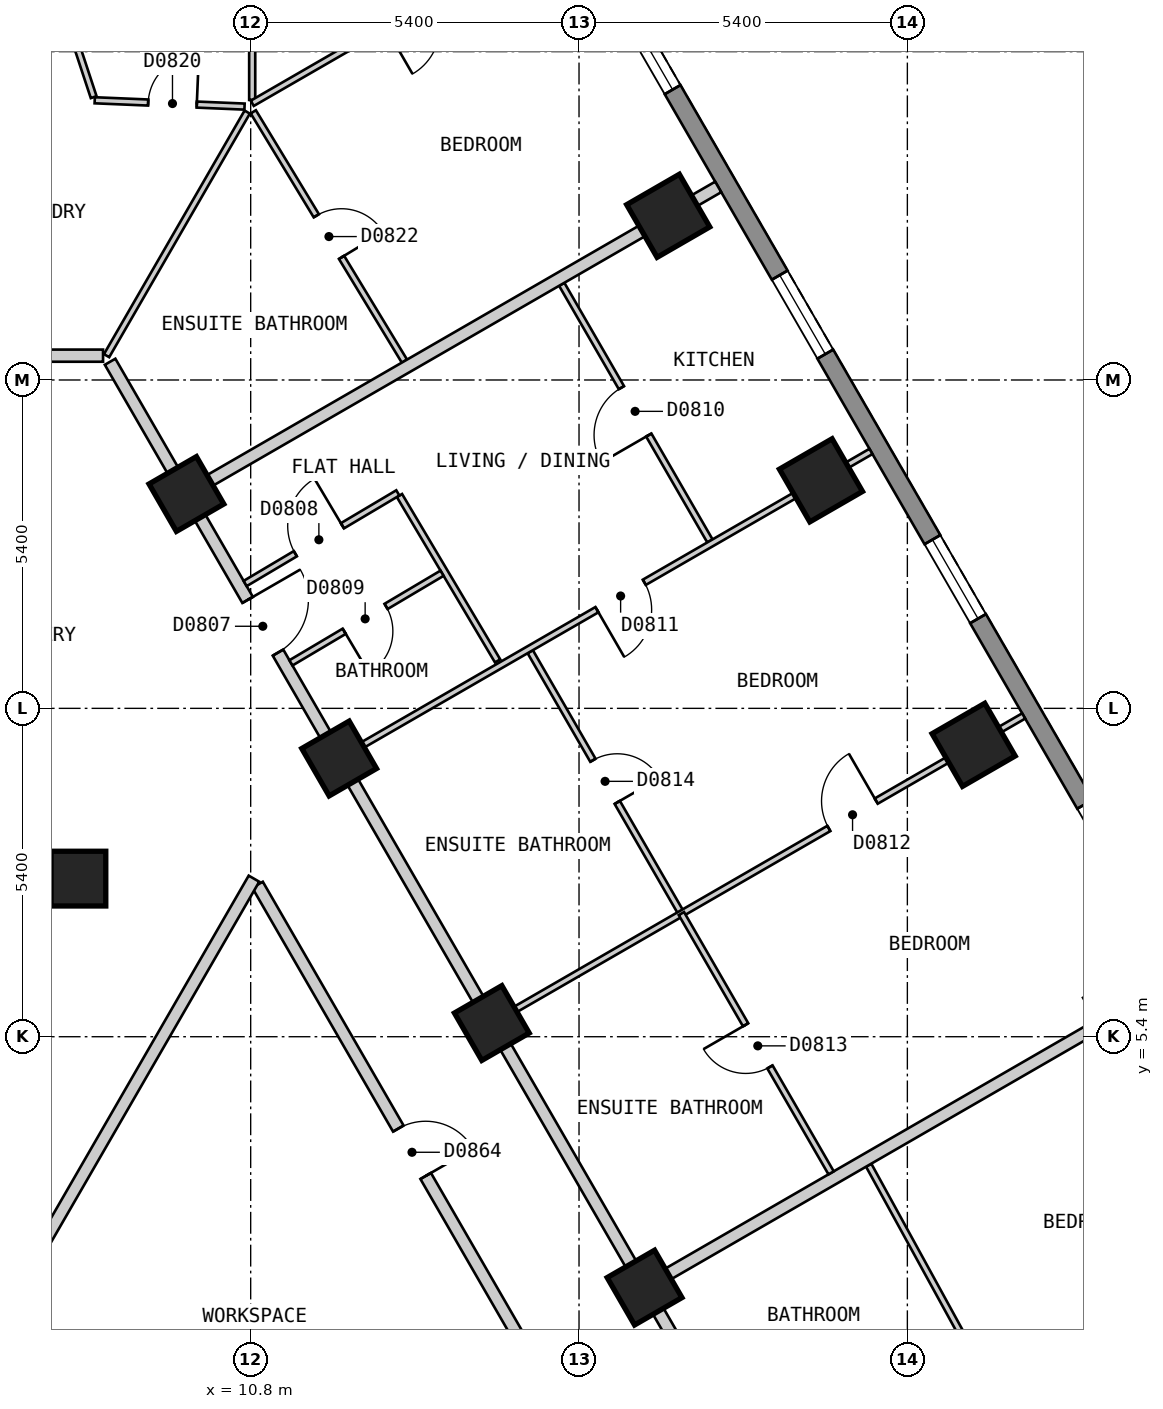
"""IFC4 building model, lengths in metres.
Left out: names, types, materials, properties, quantities, classifications, styles, units other than length and angle.
Written with IfcOpenShell. Run it as: python <this file> out.ifc"""

import sys

from ifc_helpers import new_model, si_unit, direction, frame, frame_2d, origin, origin_2d, place, context, subcontext, project, spatial, polyline, rectangle, outline, extrude, element, fill, save


model = new_model("IFC4")
c1 = context("Model", 3, precision=1e-05, world=origin(), true_north=direction((0.0, 1.0)))
c2 = subcontext(c1, "Body", "Model", "MODEL_VIEW")
j1 = project(units=[si_unit("LENGTHUNIT", "METRE"), si_unit("PLANEANGLEUNIT", "RADIAN")], contexts=[c1])
p1 = place(None, origin())
s1 = spatial("IfcSite", under=j1, at=p1, CompositionType="ELEMENT")
p2 = place(p1, origin())
s2 = spatial("IfcBuilding", under=s1, at=p2, CompositionType="ELEMENT")
p3 = place(p2, frame((0.0, 0.0, 84.0)))
s3 = spatial("IfcBuildingStorey", under=s2, at=p3, CompositionType="ELEMENT", Elevation=84.0)
for number, where, z_axis, x_axis in (
    (1, (22.69, 10.2, 0.0), (0.0, 0.0, 1.0), (-0.5, 0.866, 0.0)),
    (2, (20.179, 14.55, 0.0), (0.0, 0.0, 1.0), (-0.5, 0.866, 0.0)),
    (3, (17.667, 18.9, 0.0), (0.0, 0.0, 1.0), (-0.5, 0.866, 0.0)),
):
    element("IfcColumn", number, at=place(p3, frame(where, z_axis=z_axis, x_axis=x_axis)), inside=s3, PredefinedType="COLUMN", context=c2, shape_type="SweptSolid", body=[
        extrude(rectangle(XDim=1.0, YDim=1.0, at=origin_2d()), origin(), (0.0, 0.0, 1.0), 3.0),
    ])
for number, where, z_axis, x_axis in (
    (4, (17.278, 1.274, 0.0), (0.0, 0.0, 1.0), (-0.5, 0.866, 0.0)),
    (5, (14.766, 5.625, 0.0), (0.0, 0.0, 1.0), (-0.5, 0.866, 0.0)),
    (6, (12.255, 9.975, 0.0), (0.0, 0.0, 1.0), (-0.5, 0.866, 0.0)),
    (7, (7.967, 8.0, 0.0), (0.0, 0.0, 1.0), (1.0, 0.0, 0.0)),
    (8, (9.743, 14.325, 0.0), (0.0, 0.0, 1.0), (-0.5, 0.866, 0.0)),
):
    element("IfcColumn", number, at=place(p3, frame(where, z_axis=z_axis, x_axis=x_axis)), inside=s3, PredefinedType="COLUMN", context=c2, shape_type="SweptSolid", body=[
        extrude(rectangle(XDim=0.9, YDim=0.9, at=origin_2d()), origin(), (0.0, 0.0, 1.0), 3.0),
    ])
p4 = place(p3, frame((29.027, 1.425, 0.0), z_axis=(0.0, 0.0, 1.0), x_axis=(-0.500027479704, 0.866009537788, 0.0)))
e9 = element("IfcWall", 9, at=p4, inside=s3, PredefinedType="SOLIDWALL", context=c2, shape_type="SweptSolid", body=[
    extrude(outline(polyline([(0.0, -0.15), (26.559, -0.15), (26.478, 0.15), (0.08, 0.15), (0.0, -0.15)])), origin(), (0.0, 0.0, 1.0), 2.7),
])
p5 = place(p4, frame((2.483, 0.0, 0.15)))
e10 = element("IfcOpeningElement", 10, at=p5, cuts=e9, PredefinedType="OPENING", context=c2, shape_type="SweptSolid", body=[
    extrude(rectangle(XDim=1.5, YDim=2.1, at=frame_2d((0.75, 1.05))), frame((0.0, 0.16, 0.0), z_axis=(0.0, -1.0, 0.0), x_axis=(1.0, 0.0, 0.0)), (0.0, 0.0, 1.0), 0.32),
])
p6 = place(p4, frame((7.506, 0.0, 0.15)))
e11 = element("IfcOpeningElement", 11, at=p6, cuts=e9, PredefinedType="OPENING", context=c2, shape_type="SweptSolid", body=[
    extrude(rectangle(XDim=1.5, YDim=2.1, at=frame_2d((0.75, 1.05))), frame((0.0, 0.16, 0.0), z_axis=(0.0, -1.0, 0.0), x_axis=(1.0, 0.0, 0.0)), (0.0, 0.0, 1.0), 0.32),
])
p7 = place(p4, frame((12.529, 0.0, 0.15)))
e12 = element("IfcOpeningElement", 12, at=p7, cuts=e9, PredefinedType="OPENING", context=c2, shape_type="SweptSolid", body=[
    extrude(rectangle(XDim=1.5, YDim=2.1, at=frame_2d((0.75, 1.05))), frame((0.0, 0.16, 0.0), z_axis=(0.0, -1.0, 0.0), x_axis=(1.0, 0.0, 0.0)), (0.0, 0.0, 1.0), 0.32),
])
p8 = place(p4, frame((17.552, 0.0, 0.15)))
e13 = element("IfcOpeningElement", 13, at=p8, cuts=e9, PredefinedType="OPENING", context=c2, shape_type="SweptSolid", body=[
    extrude(rectangle(XDim=1.5, YDim=2.1, at=frame_2d((0.75, 1.05))), frame((0.0, 0.16, 0.0), z_axis=(0.0, -1.0, 0.0), x_axis=(1.0, 0.0, 0.0)), (0.0, 0.0, 1.0), 0.32),
])
p9 = place(p4, frame((22.575, 0.0, 0.15)))
e14 = element("IfcOpeningElement", 14, at=p9, cuts=e9, PredefinedType="OPENING", context=c2, shape_type="SweptSolid", body=[
    extrude(rectangle(XDim=1.5, YDim=2.1, at=frame_2d((0.75, 1.05))), frame((0.0, 0.16, 0.0), z_axis=(0.0, -1.0, 0.0), x_axis=(1.0, 0.0, 0.0)), (0.0, 0.0, 1.0), 0.32),
])
p10 = place(p3, frame((10.913, 7.899, 0.0), z_axis=(0.0, 0.0, 1.0), x_axis=(0.500028940566, -0.866008694296, 0.0)))
e15 = element("IfcWall", 15, at=p10, inside=s3, PredefinedType="PARTITIONING", context=c2, shape_type="SweptSolid", body=[
    extrude(rectangle(XDim=10.159, YDim=0.2, at=frame_2d((5.08, 0.0))), origin(), (0.0, 0.0, 1.0), 2.7),
])
p11 = place(p10, frame((4.63, 0.0, 0.0)))
e16 = element("IfcOpeningElement", 16, at=p11, cuts=e15, PredefinedType="OPENING", context=c2, shape_type="SweptSolid", body=[
    extrude(rectangle(XDim=0.9, YDim=2.1, at=frame_2d((0.45, 1.05))), frame((0.0, 0.11, 0.0), z_axis=(0.0, -1.0, 0.0), x_axis=(1.0, 0.0, 0.0)), (0.0, 0.0, 1.0), 0.22),
])
p12 = place(p3, frame((8.488, 16.5, 0.0), z_axis=(0.0, 0.0, 1.0), x_axis=(0.499986836607, -0.86603300354, 0.0)))
e17 = element("IfcWall", 17, at=p12, inside=s3, PredefinedType="PARTITIONING", context=c2, shape_type="SweptSolid", body=[
    extrude(rectangle(XDim=20.09, YDim=0.2, at=frame_2d((10.045, 0.0))), origin(), (0.0, 0.0, 1.0), 2.7),
])
p13 = place(p12, frame((4.523, 0.0, 0.0)))
e18 = element("IfcOpeningElement", 18, at=p13, cuts=e17, PredefinedType="OPENING", context=c2, shape_type="SweptSolid", body=[
    extrude(rectangle(XDim=1.0, YDim=2.1, at=frame_2d((0.5, 1.05))), frame((0.0, 0.11, 0.0), z_axis=(0.0, -1.0, 0.0), x_axis=(1.0, 0.0, 0.0)), (0.0, 0.0, 1.0), 0.22),
])
p14 = place(p3, frame((5.889, 16.6, 0.0), z_axis=(0.0, 0.0, 1.0), x_axis=(1.0, 0.0, 0.0)))
e19 = element("IfcWall", 19, at=p14, inside=s3, PredefinedType="PARTITIONING", context=c2, shape_type="SweptSolid", body=[
    extrude(rectangle(XDim=2.483, YDim=0.2, at=frame_2d((1.242, 0.0))), origin(), (0.0, 0.0, 1.0), 2.7),
])
p15 = place(p3, frame((6.928, 1.2, 0.0), z_axis=(0.0, 0.0, 1.0), x_axis=(0.500055327065, 0.865993458332, 0.0)))
e20 = element("IfcWall", 20, at=p15, inside=s3, PredefinedType="PARTITIONING", context=c2, shape_type="SweptSolid", body=[
    extrude(rectangle(XDim=7.851, YDim=0.2, at=frame_2d((3.926, 0.0))), origin(), (0.0, 0.0, 1.0), 2.7),
])
p16 = place(p3, frame((7.769, 22.212, 0.0), z_axis=(0.0, 0.0, 1.0), x_axis=(0.313312924695, -0.949649941409, 0.0)))
e21 = element("IfcWall", 21, at=p16, inside=s3, PredefinedType="PARTITIONING", context=c2, shape_type="SweptSolid", body=[
    extrude(rectangle(XDim=1.433, YDim=0.1, at=frame_2d((0.717, 0.0))), origin(), (0.0, 0.0, 1.0), 2.7),
])
p17 = place(p3, frame((10.843, 20.61, 0.0), z_axis=(0.0, 0.0, 1.0), x_axis=(0.518481125811, -0.855089072657, 0.0)))
e22 = element("IfcWall", 22, at=p17, inside=s3, PredefinedType="PARTITIONING", context=c2, shape_type="SweptSolid", body=[
    extrude(rectangle(XDim=4.795, YDim=0.1, at=frame_2d((2.397, 0.0))), origin(), (0.0, 0.0, 1.0), 2.7),
])
p18 = place(p17, frame((1.999, 0.0, 0.0)))
e23 = element("IfcOpeningElement", 23, at=p18, cuts=e22, PredefinedType="OPENING", context=c2, shape_type="SweptSolid", body=[
    extrude(rectangle(XDim=0.8, YDim=2.1, at=frame_2d((0.4, 1.05))), frame((0.0, 0.06, 0.0), z_axis=(0.0, -1.0, 0.0), x_axis=(1.0, 0.0, 0.0)), (0.0, 0.0, 1.0), 0.12),
])
p19 = place(p3, frame((13.247, 14.3, 0.0), z_axis=(0.0, 0.0, 1.0), x_axis=(0.510312234073, -0.85998919979, 0.0)))
e24 = element("IfcWall", 24, at=p19, inside=s3, PredefinedType="PARTITIONING", context=c2, shape_type="SweptSolid", body=[
    extrude(rectangle(XDim=3.163, YDim=0.1, at=frame_2d((1.582, 0.0))), origin(), (0.0, 0.0, 1.0), 2.7),
])
p20 = place(p3, frame((15.398, 11.731, 0.0), z_axis=(0.0, 0.0, 1.0), x_axis=(0.500010064822, -0.866019592779, 0.0)))
e25 = element("IfcWall", 25, at=p20, inside=s3, PredefinedType="PARTITIONING", context=c2, shape_type="SweptSolid", body=[
    extrude(rectangle(XDim=4.972, YDim=0.1, at=frame_2d((2.486, 0.0))), origin(), (0.0, 0.0, 1.0), 2.7),
])
p21 = place(p20, frame((2.061, 0.0, 0.0)))
e26 = element("IfcOpeningElement", 26, at=p21, cuts=e25, PredefinedType="OPENING", context=c2, shape_type="SweptSolid", body=[
    extrude(rectangle(XDim=0.8, YDim=2.1, at=frame_2d((0.4, 1.05))), frame((0.0, 0.06, 0.0), z_axis=(0.0, -1.0, 0.0), x_axis=(1.0, 0.0, 0.0)), (0.0, 0.0, 1.0), 0.12),
])
p22 = place(p3, frame((15.916, 17.773, 0.0), z_axis=(0.0, 0.0, 1.0), x_axis=(0.500093956194, -0.865971151354, 0.0)))
e27 = element("IfcWall", 27, at=p22, inside=s3, PredefinedType="PARTITIONING", context=c2, shape_type="SweptSolid", body=[
    extrude(rectangle(XDim=4.873, YDim=0.1, at=frame_2d((2.437, 0.0))), origin(), (0.0, 0.0, 1.0), 2.7),
])
p23 = place(p22, frame((1.962, 0.0, 0.0)))
e28 = element("IfcOpeningElement", 28, at=p23, cuts=e27, PredefinedType="OPENING", context=c2, shape_type="SweptSolid", body=[
    extrude(rectangle(XDim=0.9, YDim=2.1, at=frame_2d((0.45, 1.05))), frame((0.0, 0.06, 0.0), z_axis=(0.0, -1.0, 0.0), x_axis=(1.0, 0.0, 0.0)), (0.0, 0.0, 1.0), 0.12),
])
p24 = place(p3, frame((20.964, 3.287, 0.0), z_axis=(0.0, 0.0, 1.0), x_axis=(0.48115599782, -0.87663499004, 0.0)))
e29 = element("IfcWall", 29, at=p24, inside=s3, PredefinedType="PARTITIONING", context=c2, shape_type="SweptSolid", body=[
    extrude(rectangle(XDim=4.83, YDim=0.1, at=frame_2d((2.415, 0.0))), origin(), (0.0, 0.0, 1.0), 2.7),
])
p25 = place(p3, frame((8.235, 20.8, 0.0), z_axis=(0.0, 0.0, 1.0), x_axis=(0.999110277005, -0.042174096116, 0.0)))
e30 = element("IfcWall", 30, at=p25, inside=s3, PredefinedType="PARTITIONING", context=c2, shape_type="SweptSolid", body=[
    extrude(rectangle(XDim=2.466, YDim=0.1, at=frame_2d((1.233, 0.0))), origin(), (0.0, 0.0, 1.0), 2.7),
])
p26 = place(p25, frame((0.88, 0.0, 0.0)))
e31 = element("IfcOpeningElement", 31, at=p26, cuts=e30, PredefinedType="OPENING", context=c2, shape_type="SweptSolid", body=[
    extrude(rectangle(XDim=0.8, YDim=2.1, at=frame_2d((0.4, 1.05))), frame((0.0, 0.06, 0.0), z_axis=(0.0, -1.0, 0.0), x_axis=(1.0, 0.0, 0.0)), (0.0, 0.0, 1.0), 0.12),
])
p27 = place(p3, frame((8.43, 16.6, 0.0), z_axis=(0.0, 0.0, 1.0), x_axis=(0.50003312339, 0.866006279142, 0.0)))
e32 = element("IfcWall", 32, at=p27, inside=s3, PredefinedType="PARTITIONING", context=c2, shape_type="SweptSolid", body=[
    extrude(rectangle(XDim=4.626, YDim=0.1, at=frame_2d((2.313, 0.0))), origin(), (0.0, 0.0, 1.0), 2.7),
])
p28 = place(p3, frame((10.825, 20.806, 0.0), z_axis=(0.0, 0.0, 1.0), x_axis=(0.0, 1.0, 0.0)))
e33 = element("IfcWall", 33, at=p28, inside=s3, PredefinedType="PARTITIONING", context=c2, shape_type="SweptSolid", body=[
    extrude(rectangle(XDim=5.894, YDim=0.1, at=frame_2d((2.947, 0.0))), origin(), (0.0, 0.0, 1.0), 2.7),
])
p29 = place(p28, frame((2.468, 0.0, 0.0)))
e34 = element("IfcOpeningElement", 34, at=p29, cuts=e33, PredefinedType="OPENING", context=c2, shape_type="SweptSolid", body=[
    extrude(rectangle(XDim=0.9, YDim=2.1, at=frame_2d((0.45, 1.05))), frame((0.0, 0.06, 0.0), z_axis=(0.0, -1.0, 0.0), x_axis=(1.0, 0.0, 0.0)), (0.0, 0.0, 1.0), 0.12),
])
p30 = place(p3, frame((14.853, 5.675, 0.0), z_axis=(0.0, 0.0, 1.0), x_axis=(0.866016855193, 0.500014806302, 0.0)))
e35 = element("IfcWall", 35, at=p30, inside=s3, PredefinedType="PARTITIONING", context=c2, shape_type="SweptSolid", body=[
    extrude(rectangle(XDim=10.0, YDim=0.1, at=frame_2d((5.0, 0.0))), origin(), (0.0, 0.0, 1.0), 2.7),
])
p31 = place(p30, frame((6.3, 0.0, 0.0)))
e36 = element("IfcOpeningElement", 36, at=p31, cuts=e35, PredefinedType="OPENING", context=c2, shape_type="SweptSolid", body=[
    extrude(rectangle(XDim=0.9, YDim=2.1, at=frame_2d((0.45, 1.05))), frame((0.0, 0.06, 0.0), z_axis=(0.0, -1.0, 0.0), x_axis=(1.0, 0.0, 0.0)), (0.0, 0.0, 1.0), 0.12),
])
p32 = place(p3, frame((10.826, 20.75, 0.0), z_axis=(0.0, 0.0, 1.0), x_axis=(0.865986712877, 0.50006700863, 0.0)))
e37 = element("IfcWall", 37, at=p32, inside=s3, PredefinedType="PARTITIONING", context=c2, shape_type="SweptSolid", body=[
    extrude(rectangle(XDim=5.949, YDim=0.1, at=frame_2d((2.975, 0.0))), origin(), (0.0, 0.0, 1.0), 2.7),
])
p33 = place(p32, frame((2.524, 0.0, 0.0)))
e38 = element("IfcOpeningElement", 38, at=p33, cuts=e37, PredefinedType="OPENING", context=c2, shape_type="SweptSolid", body=[
    extrude(rectangle(XDim=0.9, YDim=2.1, at=frame_2d((0.45, 1.05))), frame((0.0, 0.06, 0.0), z_axis=(0.0, -1.0, 0.0), x_axis=(1.0, 0.0, 0.0)), (0.0, 0.0, 1.0), 0.12),
])
p34 = place(p3, frame((12.342, 10.025, 0.0), z_axis=(0.0, 0.0, 1.0), x_axis=(0.865992435864, 0.500057097767, 0.0)))
e39 = element("IfcWall", 39, at=p34, inside=s3, PredefinedType="PARTITIONING", context=c2, shape_type="SweptSolid", body=[
    extrude(rectangle(XDim=9.999, YDim=0.1, at=frame_2d((5.0, 0.0))), origin(), (0.0, 0.0, 1.0), 2.7),
])
p35 = place(p34, frame((4.795, 0.0, 0.0)))
e40 = element("IfcOpeningElement", 40, at=p35, cuts=e39, PredefinedType="OPENING", context=c2, shape_type="SweptSolid", body=[
    extrude(rectangle(XDim=0.9, YDim=2.1, at=frame_2d((0.45, 1.05))), frame((0.0, 0.06, 0.0), z_axis=(0.0, -1.0, 0.0), x_axis=(1.0, 0.0, 0.0)), (0.0, 0.0, 1.0), 0.12),
])
p36 = place(p3, frame((11.462, 11.548, 0.0), z_axis=(0.0, 0.0, 1.0), x_axis=(0.860106181478, 0.510115042498, 0.0)))
e41 = element("IfcWall", 41, at=p36, inside=s3, PredefinedType="PARTITIONING", context=c2, shape_type="SweptSolid", body=[
    extrude(rectangle(XDim=2.889, YDim=0.1, at=frame_2d((1.445, 0.0))), origin(), (0.0, 0.0, 1.0), 2.7),
])
p37 = place(p36, frame((1.019, 0.0, 0.0)))
e42 = element("IfcOpeningElement", 42, at=p37, cuts=e41, PredefinedType="OPENING", context=c2, shape_type="SweptSolid", body=[
    extrude(rectangle(XDim=0.8, YDim=2.1, at=frame_2d((0.4, 1.05))), frame((0.0, 0.06, 0.0), z_axis=(0.0, -1.0, 0.0), x_axis=(1.0, 0.0, 0.0)), (0.0, 0.0, 1.0), 0.12),
])
p38 = place(p3, frame((10.709, 12.853, 0.0), z_axis=(0.0, 0.0, 1.0), x_axis=(0.859991215576, 0.510308837011, 0.0)))
e43 = element("IfcWall", 43, at=p38, inside=s3, PredefinedType="PARTITIONING", context=c2, shape_type="SweptSolid", body=[
    extrude(rectangle(XDim=2.92, YDim=0.1, at=frame_2d((1.46, 0.0))), origin(), (0.0, 0.0, 1.0), 2.7),
])
p39 = place(p38, frame((0.96, 0.0, 0.0)))
e44 = element("IfcOpeningElement", 44, at=p39, cuts=e43, PredefinedType="OPENING", context=c2, shape_type="SweptSolid", body=[
    extrude(rectangle(XDim=0.9, YDim=2.1, at=frame_2d((0.45, 1.05))), frame((0.0, 0.06, 0.0), z_axis=(0.0, -1.0, 0.0), x_axis=(1.0, 0.0, 0.0)), (0.0, 0.0, 1.0), 0.12),
])
p40 = place(p3, frame((17.365, 1.325, 0.0), z_axis=(0.0, 0.0, 1.0), x_axis=(0.866016855193, 0.500014806302, 0.0)))
e45 = element("IfcWall", 45, at=p40, inside=s3, PredefinedType="PARTITIONING", context=c2, shape_type="SweptSolid", body=[
    extrude(rectangle(XDim=10.0, YDim=0.2, at=frame_2d((5.0, 0.0))), origin(), (0.0, 0.0, 1.0), 2.7),
])
p41 = place(p3, frame((9.83, 14.375, 0.0), z_axis=(0.0, 0.0, 1.0), x_axis=(0.865992435864, 0.500057097767, 0.0)))
e46 = element("IfcWall", 46, at=p41, inside=s3, PredefinedType="PARTITIONING", context=c2, shape_type="SweptSolid", body=[
    extrude(rectangle(XDim=9.999, YDim=0.2, at=frame_2d((5.0, 0.0))), origin(), (0.0, 0.0, 1.0), 2.7),
])
p42 = place(p3, frame((17.884, 7.425, 0.0), z_axis=(0.0, 0.0, 1.0), x_axis=(0.500000007376, -0.866025399526, 0.0)))
e47 = element("IfcWall", 47, at=p42, inside=s3, PredefinedType="PARTITIONING", context=c2, shape_type="SweptSolid", body=[
    extrude(rectangle(XDim=4.924, YDim=0.1, at=frame_2d((2.462, 0.0))), origin(), (0.0, 0.0, 1.0), 2.7),
])
p43 = place(p42, frame((2.112, 0.0, 0.0)))
e48 = element("IfcOpeningElement", 48, at=p43, cuts=e47, PredefinedType="OPENING", context=c2, shape_type="SweptSolid", body=[
    extrude(rectangle(XDim=0.8, YDim=2.1, at=frame_2d((0.4, 1.05))), frame((0.0, 0.06, 0.0), z_axis=(0.0, -1.0, 0.0), x_axis=(1.0, 0.0, 0.0)), (0.0, 0.0, 1.0), 0.12),
])
p44 = place(p7, origin())
e49 = element("IfcWindow", 49, at=p44, inside=s3, PartitioningType="SINGLE_PANEL", PredefinedType="WINDOW", context=c2, shape_type="SweptSolid", body=[
    extrude(rectangle(XDim=1.5, YDim=2.1, at=frame_2d((0.75, 1.05))), frame((0.0, 0.03, 0.0), z_axis=(0.0, -1.0, 0.0), x_axis=(1.0, 0.0, 0.0)), (0.0, 0.0, 1.0), 0.06),
])
fill(e12, e49)
p45 = place(p8, origin())
e50 = element("IfcWindow", 50, at=p45, inside=s3, PartitioningType="SINGLE_PANEL", PredefinedType="WINDOW", context=c2, shape_type="SweptSolid", body=[
    extrude(rectangle(XDim=1.5, YDim=2.1, at=frame_2d((0.75, 1.05))), frame((0.0, 0.03, 0.0), z_axis=(0.0, -1.0, 0.0), x_axis=(1.0, 0.0, 0.0)), (0.0, 0.0, 1.0), 0.06),
])
fill(e13, e50)
p46 = place(p9, origin())
e51 = element("IfcWindow", 51, at=p46, inside=s3, PartitioningType="SINGLE_PANEL", PredefinedType="WINDOW", context=c2, shape_type="SweptSolid", body=[
    extrude(rectangle(XDim=1.5, YDim=2.1, at=frame_2d((0.75, 1.05))), frame((0.0, 0.03, 0.0), z_axis=(0.0, -1.0, 0.0), x_axis=(1.0, 0.0, 0.0)), (0.0, 0.0, 1.0), 0.06),
])
fill(e14, e51)
p47 = place(p13, origin())
e52 = element("IfcDoor", 52, at=p47, inside=s3, OperationType="SINGLE_SWING_LEFT", PredefinedType="DOOR", context=c2, shape_type="SweptSolid", body=[
    extrude(rectangle(XDim=1.0, YDim=2.1, at=frame_2d((0.5, 1.05))), frame((0.0, 0.025, 0.0), z_axis=(0.0, -1.0, 0.0), x_axis=(1.0, 0.0, 0.0)), (0.0, 0.0, 1.0), 0.05),
])
fill(e18, e52)
p48 = place(p39, origin())
e53 = element("IfcDoor", 53, at=p48, inside=s3, OperationType="SINGLE_SWING_RIGHT", PredefinedType="DOOR", context=c2, shape_type="SweptSolid", body=[
    extrude(rectangle(XDim=0.9, YDim=2.1, at=frame_2d((0.45, 1.05))), frame((0.0, 0.025, 0.0), z_axis=(0.0, -1.0, 0.0), x_axis=(1.0, 0.0, 0.0)), (0.0, 0.0, 1.0), 0.05),
])
fill(e44, e53)
p49 = place(p37, origin())
e54 = element("IfcDoor", 54, at=p49, inside=s3, OperationType="SINGLE_SWING_LEFT", PredefinedType="DOOR", context=c2, shape_type="SweptSolid", body=[
    extrude(rectangle(XDim=0.8, YDim=2.1, at=frame_2d((0.4, 1.05))), frame((0.0, 0.025, 0.0), z_axis=(0.0, -1.0, 0.0), x_axis=(1.0, 0.0, 0.0)), (0.0, 0.0, 1.0), 0.05),
])
fill(e42, e54)
p50 = place(p23, origin())
e55 = element("IfcDoor", 55, at=p50, inside=s3, OperationType="SINGLE_SWING_RIGHT", PredefinedType="DOOR", context=c2, shape_type="SweptSolid", body=[
    extrude(rectangle(XDim=0.9, YDim=2.1, at=frame_2d((0.45, 1.05))), frame((0.0, 0.025, 0.0), z_axis=(0.0, -1.0, 0.0), x_axis=(1.0, 0.0, 0.0)), (0.0, 0.0, 1.0), 0.05),
])
fill(e28, e55)
p51 = place(p35, origin())
e56 = element("IfcDoor", 56, at=p51, inside=s3, OperationType="SINGLE_SWING_LEFT", PredefinedType="DOOR", context=c2, shape_type="SweptSolid", body=[
    extrude(rectangle(XDim=0.9, YDim=2.1, at=frame_2d((0.45, 1.05))), frame((0.0, 0.025, 0.0), z_axis=(0.0, -1.0, 0.0), x_axis=(1.0, 0.0, 0.0)), (0.0, 0.0, 1.0), 0.05),
])
fill(e40, e56)
p52 = place(p31, origin())
e57 = element("IfcDoor", 57, at=p52, inside=s3, OperationType="SINGLE_SWING_RIGHT", PredefinedType="DOOR", context=c2, shape_type="SweptSolid", body=[
    extrude(rectangle(XDim=0.9, YDim=2.1, at=frame_2d((0.45, 1.05))), frame((0.0, 0.025, 0.0), z_axis=(0.0, -1.0, 0.0), x_axis=(1.0, 0.0, 0.0)), (0.0, 0.0, 1.0), 0.05),
])
fill(e36, e57)
p53 = place(p43, origin())
e58 = element("IfcDoor", 58, at=p53, inside=s3, OperationType="SINGLE_SWING_LEFT", PredefinedType="DOOR", context=c2, shape_type="SweptSolid", body=[
    extrude(rectangle(XDim=0.8, YDim=2.1, at=frame_2d((0.4, 1.05))), frame((0.0, 0.025, 0.0), z_axis=(0.0, -1.0, 0.0), x_axis=(1.0, 0.0, 0.0)), (0.0, 0.0, 1.0), 0.05),
])
fill(e48, e58)
p54 = place(p21, origin())
e59 = element("IfcDoor", 59, at=p54, inside=s3, OperationType="SINGLE_SWING_RIGHT", PredefinedType="DOOR", context=c2, shape_type="SweptSolid", body=[
    extrude(rectangle(XDim=0.8, YDim=2.1, at=frame_2d((0.4, 1.05))), frame((0.0, 0.025, 0.0), z_axis=(0.0, -1.0, 0.0), x_axis=(1.0, 0.0, 0.0)), (0.0, 0.0, 1.0), 0.05),
])
fill(e26, e59)
p55 = place(p26, origin())
e60 = element("IfcDoor", 60, at=p55, inside=s3, OperationType="SINGLE_SWING_RIGHT", PredefinedType="DOOR", context=c2, shape_type="SweptSolid", body=[
    extrude(rectangle(XDim=0.8, YDim=2.1, at=frame_2d((0.4, 1.05))), frame((0.0, 0.025, 0.0), z_axis=(0.0, -1.0, 0.0), x_axis=(1.0, 0.0, 0.0)), (0.0, 0.0, 1.0), 0.05),
])
fill(e31, e60)
p56 = place(p18, origin())
e61 = element("IfcDoor", 61, at=p56, inside=s3, OperationType="SINGLE_SWING_RIGHT", PredefinedType="DOOR", context=c2, shape_type="SweptSolid", body=[
    extrude(rectangle(XDim=0.8, YDim=2.1, at=frame_2d((0.4, 1.05))), frame((0.0, 0.025, 0.0), z_axis=(0.0, -1.0, 0.0), x_axis=(1.0, 0.0, 0.0)), (0.0, 0.0, 1.0), 0.05),
])
fill(e23, e61)
p57 = place(p11, origin())
e62 = element("IfcDoor", 62, at=p57, inside=s3, OperationType="SINGLE_SWING_RIGHT", PredefinedType="DOOR", context=c2, shape_type="SweptSolid", body=[
    extrude(rectangle(XDim=0.9, YDim=2.1, at=frame_2d((0.45, 1.05))), frame((0.0, 0.025, 0.0), z_axis=(0.0, -1.0, 0.0), x_axis=(1.0, 0.0, 0.0)), (0.0, 0.0, 1.0), 0.05),
])
fill(e16, e62)
save(model, sys.argv[1])
